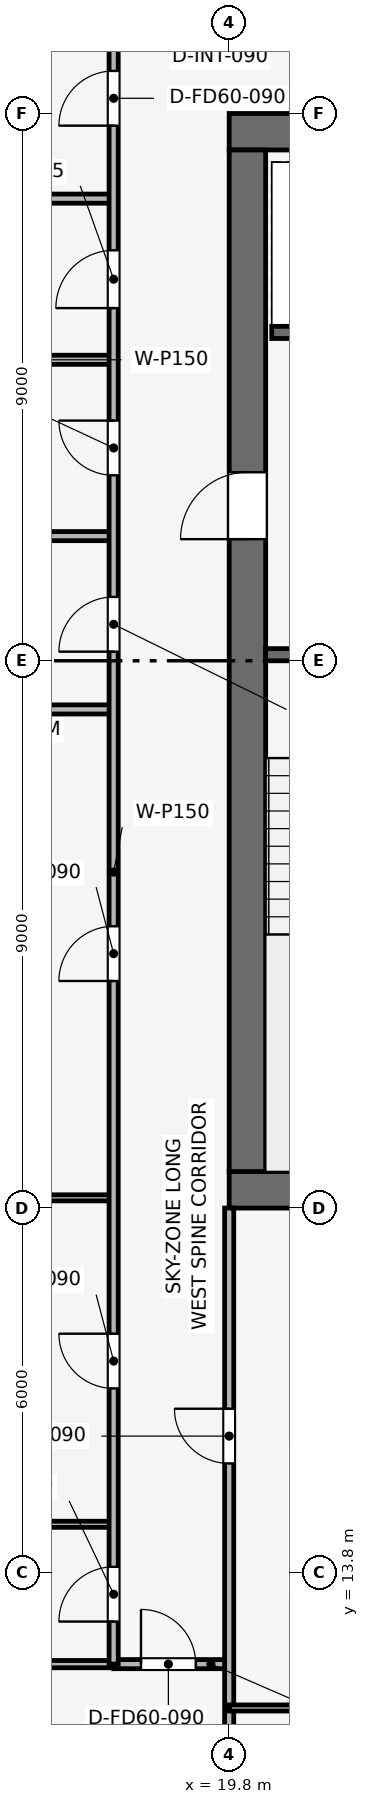
"""IFC4 building model, lengths in metres.
Left out: names, types, materials, properties, quantities, classifications, styles, units other than length and angle.
Written with IfcOpenShell. Run it as: python <this file> out.ifc"""

import sys

from ifc_helpers import new_model, si_unit, direction, frame, frame_2d, origin, place, context, subcontext, project, spatial, rectangle, extrude, element, fill, save


model = new_model("IFC4")
c1 = context("Model", 3, precision=1e-05, world=origin(), true_north=direction((0.0, 1.0)))
c2 = subcontext(c1, "Body", "Model", "MODEL_VIEW")
j1 = project(units=[si_unit("LENGTHUNIT", "METRE"), si_unit("PLANEANGLEUNIT", "RADIAN")], contexts=[c1])
p1 = place(None, origin())
s1 = spatial("IfcSite", under=j1, at=p1, CompositionType="ELEMENT")
p2 = place(p1, origin())
s2 = spatial("IfcBuilding", under=s1, at=p2, CompositionType="ELEMENT")
p3 = place(p2, frame((0.0, 0.0, 321.75)))
s3 = spatial("IfcBuildingStorey", under=s2, at=p3, CompositionType="ELEMENT", Elevation=321.75)
p4 = place(p3, frame((19.8, 20.1, 0.0), z_axis=(0.0, 0.0, 1.0), x_axis=(1.0, 0.0, 0.0)))
e1 = element("IfcWall", 1, at=p4, inside=s3, PredefinedType="SHEAR", context=c2, shape_type="SweptSolid", body=[
    extrude(rectangle(XDim=18.0, YDim=0.6, at=frame_2d((9.0, 0.0))), origin(), (0.0, 0.0, 1.0), 3.75),
])
p5 = place(p3, frame((19.8, 37.5, 0.0), z_axis=(0.0, 0.0, 1.0), x_axis=(1.0, 0.0, 0.0)))
e2 = element("IfcWall", 2, at=p5, inside=s3, PredefinedType="SHEAR", context=c2, shape_type="SweptSolid", body=[
    extrude(rectangle(XDim=18.0, YDim=0.6, at=frame_2d((9.0, 0.0))), origin(), (0.0, 0.0, 1.0), 3.75),
])
p6 = place(p5, frame((7.05, 0.0, 0.0)))
e3 = element("IfcOpeningElement", 3, at=p6, cuts=e2, PredefinedType="OPENING", context=c2, shape_type="SweptSolid", body=[
    extrude(rectangle(XDim=1.1, YDim=2.15, at=frame_2d((0.55, 1.075))), frame((0.0, 0.31, 0.0), z_axis=(0.0, -1.0, 0.0), x_axis=(1.0, 0.0, 0.0)), (0.0, 0.0, 1.0), 0.62),
])
p7 = place(p3, frame((20.1, 20.4, 0.0), z_axis=(0.0, 0.0, 1.0), x_axis=(0.0, 1.0, 0.0)))
e4 = element("IfcWall", 4, at=p7, inside=s3, PredefinedType="SHEAR", context=c2, shape_type="SweptSolid", body=[
    extrude(rectangle(XDim=16.8, YDim=0.6, at=frame_2d((8.4, 0.0))), origin(), (0.0, 0.0, 1.0), 3.75),
])
p8 = place(p7, frame((10.4, 0.0, 0.0)))
e5 = element("IfcOpeningElement", 5, at=p8, cuts=e4, PredefinedType="OPENING", context=c2, shape_type="SweptSolid", body=[
    extrude(rectangle(XDim=1.1, YDim=2.15, at=frame_2d((0.55, 1.075))), frame((0.0, 0.31, 0.0), z_axis=(0.0, -1.0, 0.0), x_axis=(1.0, 0.0, 0.0)), (0.0, 0.0, 1.0), 0.62),
])
p9 = place(p3, frame((20.4, 28.9, 0.0), z_axis=(0.0, 0.0, 1.0), x_axis=(1.0, 0.0, 0.0)))
e6 = element("IfcWall", 6, at=p9, inside=s3, PredefinedType="SHEAR", context=c2, shape_type="SweptSolid", body=[
    extrude(rectangle(XDim=3.15, YDim=0.2, at=frame_2d((1.575, 0.0))), origin(), (0.0, 0.0, 1.0), 3.51),
])
p10 = place(p9, frame((0.8, 0.0, 0.0)))
e7 = element("IfcOpeningElement", 7, at=p10, cuts=e6, PredefinedType="OPENING", context=c2, shape_type="SweptSolid", body=[
    extrude(rectangle(XDim=1.0, YDim=2.1, at=frame_2d((0.5, 1.05))), frame((0.0, 0.11, 0.0), z_axis=(0.0, -1.0, 0.0), x_axis=(1.0, 0.0, 0.0)), (0.0, 0.0, 1.0), 0.22),
])
p11 = place(p3, frame((20.5, 34.2, 0.0), z_axis=(0.0, 0.0, 1.0), x_axis=(1.0, 0.0, 0.0)))
e8 = element("IfcWall", 8, at=p11, inside=s3, PredefinedType="SHEAR", context=c2, shape_type="SweptSolid", body=[
    extrude(rectangle(XDim=3.05, YDim=0.2, at=frame_2d((1.525, 0.0))), origin(), (0.0, 0.0, 1.0), 3.51),
])
p12 = place(p11, frame((0.75, 0.0, 0.0)))
e9 = element("IfcOpeningElement", 9, at=p12, cuts=e8, PredefinedType="OPENING", context=c2, shape_type="SweptSolid", body=[
    extrude(rectangle(XDim=1.1, YDim=2.15, at=frame_2d((0.55, 1.075))), frame((0.0, 0.11, 0.0), z_axis=(0.0, -1.0, 0.0), x_axis=(1.0, 0.0, 0.0)), (0.0, 0.0, 1.0), 0.22),
])
p13 = place(p3, frame((6.13, 28.0, 0.0), z_axis=(0.0, 0.0, 1.0), x_axis=(1.0, 0.0, 0.0)))
e10 = element("IfcWall", 10, at=p13, inside=s3, PredefinedType="PARTITIONING", context=c2, shape_type="SweptSolid", body=[
    extrude(rectangle(XDim=11.77, YDim=0.15, at=frame_2d((5.885, 0.0))), origin(), (0.0, 0.0, 1.0), 3.135),
])
for number, where, z_axis, x_axis in (
    (11, (14.8, 36.4, 0.0), (0.0, 0.0, 1.0), (1.0, 0.0, 0.0)),
    (12, (14.8, 30.85, 0.0), (0.0, 0.0, 1.0), (1.0, 0.0, 0.0)),
    (13, (14.8, 33.75, 0.0), (0.0, 0.0, 1.0), (1.0, 0.0, 0.0)),
):
    element("IfcWall", number, at=place(p3, frame(where, z_axis=z_axis, x_axis=x_axis)), inside=s3, PredefinedType="PARTITIONING", context=c2, shape_type="SweptSolid", body=[
        extrude(rectangle(XDim=3.1, YDim=0.15, at=frame_2d((1.55, 0.0))), origin(), (0.0, 0.0, 1.0), 3.135),
    ])
p14 = place(p3, frame((6.13, 14.6, 0.0), z_axis=(0.0, 0.0, 1.0), x_axis=(1.0, 0.0, 0.0)))
e14 = element("IfcWall", 14, at=p14, inside=s3, PredefinedType="MOVABLE", context=c2, shape_type="SweptSolid", body=[
    extrude(rectangle(XDim=11.77, YDim=0.1, at=frame_2d((5.885, 0.0))), origin(), (0.0, 0.0, 1.0), 3.095),
])
p15 = place(p3, frame((6.13, 19.968, 0.0), z_axis=(0.0, 0.0, 1.0), x_axis=(1.0, 0.0, 0.0)))
e15 = element("IfcWall", 15, at=p15, inside=s3, PredefinedType="MOVABLE", context=c2, shape_type="SweptSolid", body=[
    extrude(rectangle(XDim=11.77, YDim=0.1, at=frame_2d((5.885, 0.0))), origin(), (0.0, 0.0, 1.0), 3.195),
])
p16 = place(p3, frame((12.3, 12.3, 0.0), z_axis=(0.0, 0.0, 1.0), x_axis=(1.0, 0.0, 0.0)))
e16 = element("IfcWall", 16, at=p16, inside=s3, PredefinedType="PARTITIONING", context=c2, shape_type="SweptSolid", body=[
    extrude(rectangle(XDim=5.6, YDim=0.12, at=frame_2d((2.8, 0.0))), origin(), (0.0, 0.0, 1.0), 3.195),
])
p17 = place(p3, frame((17.9, 12.3, 0.0), z_axis=(0.0, 0.0, 1.0), x_axis=(1.0, 0.0, 0.0)))
e17 = element("IfcWall", 17, at=p17, inside=s3, PredefinedType="PARTITIONING", context=c2, shape_type="SweptSolid", body=[
    extrude(rectangle(XDim=1.9, YDim=0.15, at=frame_2d((0.95, 0.0))), origin(), (0.0, 0.0, 1.0), 3.51),
])
p18 = place(p17, frame((0.45, 0.0, 0.0)))
e18 = element("IfcOpeningElement", 18, at=p18, cuts=e17, PredefinedType="OPENING", context=c2, shape_type="SweptSolid", body=[
    extrude(rectangle(XDim=0.9, YDim=2.1, at=frame_2d((0.45, 1.05))), frame((0.0, 0.085, 0.0), z_axis=(0.0, -1.0, 0.0), x_axis=(1.0, 0.0, 0.0)), (0.0, 0.0, 1.0), 0.17),
])
p19 = place(p3, frame((19.8, 6.13, 0.0), z_axis=(0.0, 0.0, 1.0), x_axis=(0.0, 1.0, 0.0)))
e19 = element("IfcWall", 19, at=p19, inside=s3, PredefinedType="PARTITIONING", context=c2, shape_type="SweptSolid", body=[
    extrude(rectangle(XDim=13.67, YDim=0.15, at=frame_2d((6.835, 0.0))), origin(), (0.0, 0.0, 1.0), 3.095),
])
p20 = place(p19, frame((9.47, 0.0, 0.0)))
e20 = element("IfcOpeningElement", 20, at=p20, cuts=e19, PredefinedType="OPENING", context=c2, shape_type="SweptSolid", body=[
    extrude(rectangle(XDim=0.9, YDim=2.1, at=frame_2d((0.45, 1.05))), frame((0.0, 0.085, 0.0), z_axis=(0.0, -1.0, 0.0), x_axis=(1.0, 0.0, 0.0)), (0.0, 0.0, 1.0), 0.17),
])
p21 = place(p3, frame((19.8, 11.579, 0.0), z_axis=(0.0, 0.0, 1.0), x_axis=(1.0, 0.0, 0.0)))
e21 = element("IfcWall", 21, at=p21, inside=s3, PredefinedType="MOVABLE", context=c2, shape_type="SweptSolid", body=[
    extrude(rectangle(XDim=2.509, YDim=0.1, at=frame_2d((1.254, 0.0))), origin(), (0.0, 0.0, 1.0), 3.095),
])
p22 = place(p21, frame((1.409, 0.0, 0.0)))
e22 = element("IfcOpeningElement", 22, at=p22, cuts=e21, PredefinedType="OPENING", context=c2, shape_type="SweptSolid", body=[
    extrude(rectangle(XDim=0.9, YDim=2.1, at=frame_2d((0.45, 1.05))), frame((0.0, 0.06, 0.0), z_axis=(0.0, -1.0, 0.0), x_axis=(1.0, 0.0, 0.0)), (0.0, 0.0, 1.0), 0.12),
])
p23 = place(p3, frame((17.9, 12.3, 0.0), z_axis=(0.0, 0.0, 1.0), x_axis=(0.0, 1.0, 0.0)))
e23 = element("IfcWall", 23, at=p23, inside=s3, PredefinedType="PARTITIONING", context=c2, shape_type="SweptSolid", body=[
    extrude(rectangle(XDim=27.4, YDim=0.15, at=frame_2d((13.7, 0.0))), origin(), (0.0, 0.0, 1.0), 3.095),
])
p24 = place(p23, frame((0.7, 0.0, 0.0)))
e24 = element("IfcOpeningElement", 24, at=p24, cuts=e23, PredefinedType="OPENING", context=c2, shape_type="SweptSolid", body=[
    extrude(rectangle(XDim=0.9, YDim=2.1, at=frame_2d((0.45, 1.05))), frame((0.0, 0.085, 0.0), z_axis=(0.0, -1.0, 0.0), x_axis=(1.0, 0.0, 0.0)), (0.0, 0.0, 1.0), 0.17),
])
p25 = place(p23, frame((4.534, 0.0, 0.0)))
e25 = element("IfcOpeningElement", 25, at=p25, cuts=e23, PredefinedType="OPENING", context=c2, shape_type="SweptSolid", body=[
    extrude(rectangle(XDim=0.9, YDim=2.1, at=frame_2d((0.45, 1.05))), frame((0.0, 0.085, 0.0), z_axis=(0.0, -1.0, 0.0), x_axis=(1.0, 0.0, 0.0)), (0.0, 0.0, 1.0), 0.17),
])
p26 = place(p23, frame((11.234, 0.0, 0.0)))
e26 = element("IfcOpeningElement", 26, at=p26, cuts=e23, PredefinedType="OPENING", context=c2, shape_type="SweptSolid", body=[
    extrude(rectangle(XDim=0.9, YDim=2.1, at=frame_2d((0.45, 1.05))), frame((0.0, 0.085, 0.0), z_axis=(0.0, -1.0, 0.0), x_axis=(1.0, 0.0, 0.0)), (0.0, 0.0, 1.0), 0.17),
])
p27 = place(p23, frame((16.65, 0.0, 0.0)))
e27 = element("IfcOpeningElement", 27, at=p27, cuts=e23, PredefinedType="OPENING", context=c2, shape_type="SweptSolid", body=[
    extrude(rectangle(XDim=0.9, YDim=2.1, at=frame_2d((0.45, 1.05))), frame((0.0, 0.085, 0.0), z_axis=(0.0, -1.0, 0.0), x_axis=(1.0, 0.0, 0.0)), (0.0, 0.0, 1.0), 0.17),
])
p28 = place(p23, frame((19.55, 0.0, 0.0)))
e28 = element("IfcOpeningElement", 28, at=p28, cuts=e23, PredefinedType="OPENING", context=c2, shape_type="SweptSolid", body=[
    extrude(rectangle(XDim=0.9, YDim=2.1, at=frame_2d((0.45, 1.05))), frame((0.0, 0.085, 0.0), z_axis=(0.0, -1.0, 0.0), x_axis=(1.0, 0.0, 0.0)), (0.0, 0.0, 1.0), 0.17),
])
p29 = place(p23, frame((22.3, 0.0, 0.0)))
e29 = element("IfcOpeningElement", 29, at=p29, cuts=e23, PredefinedType="OPENING", context=c2, shape_type="SweptSolid", body=[
    extrude(rectangle(XDim=0.95, YDim=2.1, at=frame_2d((0.475, 1.05))), frame((0.0, 0.085, 0.0), z_axis=(0.0, -1.0, 0.0), x_axis=(1.0, 0.0, 0.0)), (0.0, 0.0, 1.0), 0.17),
])
p30 = place(p23, frame((25.3, 0.0, 0.0)))
e30 = element("IfcOpeningElement", 30, at=p30, cuts=e23, PredefinedType="OPENING", context=c2, shape_type="SweptSolid", body=[
    extrude(rectangle(XDim=0.9, YDim=2.1, at=frame_2d((0.45, 1.05))), frame((0.0, 0.085, 0.0), z_axis=(0.0, -1.0, 0.0), x_axis=(1.0, 0.0, 0.0)), (0.0, 0.0, 1.0), 0.17),
])
p31 = place(p18, origin())
e31 = element("IfcDoor", 31, at=p31, inside=s3, OperationType="SINGLE_SWING_LEFT", PredefinedType="DOOR", context=c2, shape_type="SweptSolid", body=[
    extrude(rectangle(XDim=0.9, YDim=2.1, at=frame_2d((0.45, 1.05))), frame((0.0, 0.025, 0.0), z_axis=(0.0, -1.0, 0.0), x_axis=(1.0, 0.0, 0.0)), (0.0, 0.0, 1.0), 0.05),
])
fill(e18, e31)
p32 = place(p20, origin())
e32 = element("IfcDoor", 32, at=p32, inside=s3, OperationType="SINGLE_SWING_RIGHT", PredefinedType="DOOR", context=c2, shape_type="SweptSolid", body=[
    extrude(rectangle(XDim=0.9, YDim=2.1, at=frame_2d((0.45, 1.05))), frame((0.0, 0.025, 0.0), z_axis=(0.0, -1.0, 0.0), x_axis=(1.0, 0.0, 0.0)), (0.0, 0.0, 1.0), 0.05),
])
fill(e20, e32)
p33 = place(p24, origin())
e33 = element("IfcDoor", 33, at=p33, inside=s3, OperationType="SINGLE_SWING_LEFT", PredefinedType="DOOR", context=c2, shape_type="SweptSolid", body=[
    extrude(rectangle(XDim=0.9, YDim=2.1, at=frame_2d((0.45, 1.05))), frame((0.0, 0.025, 0.0), z_axis=(0.0, -1.0, 0.0), x_axis=(1.0, 0.0, 0.0)), (0.0, 0.0, 1.0), 0.05),
])
fill(e24, e33)
p34 = place(p25, origin())
e34 = element("IfcDoor", 34, at=p34, inside=s3, OperationType="SINGLE_SWING_RIGHT", PredefinedType="DOOR", context=c2, shape_type="SweptSolid", body=[
    extrude(rectangle(XDim=0.9, YDim=2.1, at=frame_2d((0.45, 1.05))), frame((0.0, 0.025, 0.0), z_axis=(0.0, -1.0, 0.0), x_axis=(1.0, 0.0, 0.0)), (0.0, 0.0, 1.0), 0.05),
])
fill(e25, e34)
p35 = place(p26, origin())
e35 = element("IfcDoor", 35, at=p35, inside=s3, OperationType="SINGLE_SWING_LEFT", PredefinedType="DOOR", context=c2, shape_type="SweptSolid", body=[
    extrude(rectangle(XDim=0.9, YDim=2.1, at=frame_2d((0.45, 1.05))), frame((0.0, 0.025, 0.0), z_axis=(0.0, -1.0, 0.0), x_axis=(1.0, 0.0, 0.0)), (0.0, 0.0, 1.0), 0.05),
])
fill(e26, e35)
p36 = place(p27, origin())
e36 = element("IfcDoor", 36, at=p36, inside=s3, OperationType="SINGLE_SWING_LEFT", PredefinedType="DOOR", context=c2, shape_type="SweptSolid", body=[
    extrude(rectangle(XDim=0.9, YDim=2.1, at=frame_2d((0.45, 1.05))), frame((0.0, 0.025, 0.0), z_axis=(0.0, -1.0, 0.0), x_axis=(1.0, 0.0, 0.0)), (0.0, 0.0, 1.0), 0.05),
])
fill(e27, e36)
p37 = place(p28, origin())
e37 = element("IfcDoor", 37, at=p37, inside=s3, OperationType="SINGLE_SWING_RIGHT", PredefinedType="DOOR", context=c2, shape_type="SweptSolid", body=[
    extrude(rectangle(XDim=0.9, YDim=2.1, at=frame_2d((0.45, 1.05))), frame((0.0, 0.025, 0.0), z_axis=(0.0, -1.0, 0.0), x_axis=(1.0, 0.0, 0.0)), (0.0, 0.0, 1.0), 0.05),
])
fill(e28, e37)
p38 = place(p29, origin())
e38 = element("IfcDoor", 38, at=p38, inside=s3, OperationType="SINGLE_SWING_LEFT", PredefinedType="DOOR", context=c2, shape_type="SweptSolid", body=[
    extrude(rectangle(XDim=0.95, YDim=2.1, at=frame_2d((0.475, 1.05))), frame((0.0, 0.025, 0.0), z_axis=(0.0, -1.0, 0.0), x_axis=(1.0, 0.0, 0.0)), (0.0, 0.0, 1.0), 0.05),
])
fill(e29, e38)
p39 = place(p30, origin())
e39 = element("IfcDoor", 39, at=p39, inside=s3, OperationType="SINGLE_SWING_LEFT", PredefinedType="DOOR", context=c2, shape_type="SweptSolid", body=[
    extrude(rectangle(XDim=0.9, YDim=2.1, at=frame_2d((0.45, 1.05))), frame((0.0, 0.025, 0.0), z_axis=(0.0, -1.0, 0.0), x_axis=(1.0, 0.0, 0.0)), (0.0, 0.0, 1.0), 0.05),
])
fill(e30, e39)
p40 = place(p8, origin())
e40 = element("IfcDoor", 40, at=p40, inside=s3, OperationType="SINGLE_SWING_LEFT", PredefinedType="DOOR", context=c2, shape_type="SweptSolid", body=[
    extrude(rectangle(XDim=1.1, YDim=2.15, at=frame_2d((0.55, 1.075))), frame((0.0, 0.025, 0.0), z_axis=(0.0, -1.0, 0.0), x_axis=(1.0, 0.0, 0.0)), (0.0, 0.0, 1.0), 0.05),
])
fill(e5, e40)
save(model, sys.argv[1])
